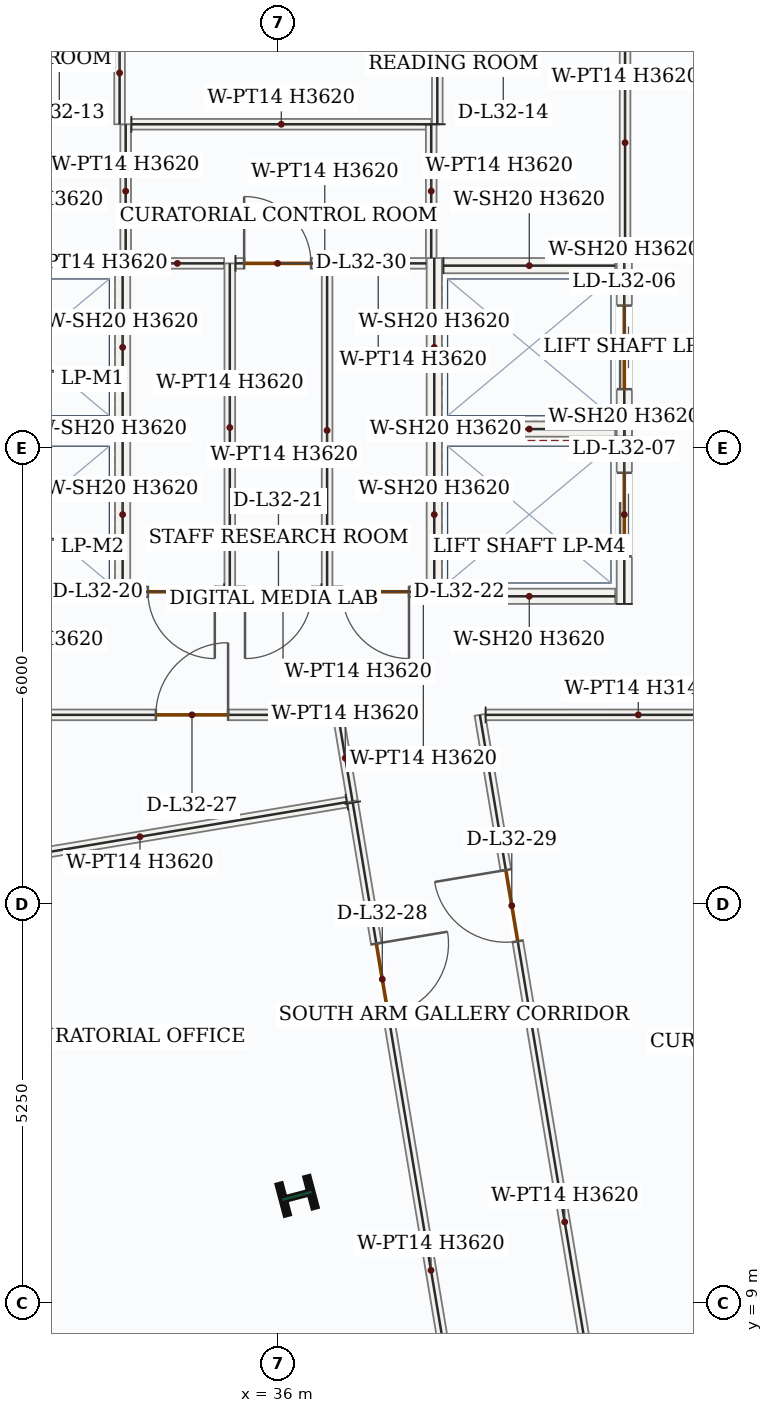
"""IFC4 building model, lengths in metres.
Left out: names, types, materials, properties, quantities, classifications, styles, units other than length and angle.
Written with IfcOpenShell. Run it as: python <this file> out.ifc"""

import sys

from ifc_helpers import new_model, si_unit, direction, frame, frame_2d, origin, origin_2d, place, context, subcontext, project, spatial, rectangle, i_section, extrude, source, transform, mapped, element, fill, save


model = new_model("IFC4")
c1 = context("Model", 3, precision=1e-05, world=origin(), true_north=direction((0.0, 1.0)))
c2 = subcontext(c1, "Body", "Model", "MODEL_VIEW")
j1 = project(units=[si_unit("LENGTHUNIT", "METRE"), si_unit("PLANEANGLEUNIT", "RADIAN")], contexts=[c1])
p1 = place(None, origin())
s1 = spatial("IfcSite", under=j1, at=p1, CompositionType="ELEMENT")
p2 = place(p1, origin())
s2 = spatial("IfcBuilding", under=s1, at=p2, CompositionType="ELEMENT")
p3 = place(p2, frame((0.0, 0.0, 143.4)))
s3 = spatial("IfcBuildingStorey", under=s2, at=p3, CompositionType="ELEMENT", Elevation=143.4)
m1 = source(origin(), c2, "Body", "SweptSolid", [
    extrude(i_section(OverallWidth=0.412, OverallDepth=0.435, WebThickness=0.036, FlangeThickness=0.057, FilletRadius=0.018, at=origin_2d()), origin(), (0.0, 0.0, 1.0), 3.9),
])
p4 = place(p3, frame((36.245, 10.412, 0.0), z_axis=(0.0, 0.0, 1.0), x_axis=(-0.255445757936, 0.966823388604, 0.0)))
e1 = element("IfcColumn", 1, at=p4, inside=s3, PredefinedType="COLUMN", context=c2, shape_type="MappedRepresentation", body=[
    mapped(m1, transform((0.0, 0.0, 0.0), x_axis=(1.0, 0.0, 0.0), y_axis=(0.0, 1.0, 0.0), z_axis=(0.0, 0.0, 1.0), scale=1.0)),
])
m2 = source(origin(), c2, "Body", "SweptSolid", [
    extrude(rectangle(XDim=2.35, YDim=0.2, at=frame_2d((1.175, 0.0))), origin(), (0.0, 0.0, 1.0), 3.62),
])
p5 = place(p3, frame((33.95, 20.4, 0.0), z_axis=(0.0, 0.0, 1.0), x_axis=(0.0, 1.0, 0.0)))
e2 = element("IfcWall", 2, at=p5, inside=s3, PredefinedType="SOLIDWALL", context=c2, shape_type="MappedRepresentation", body=[
    mapped(m2, transform((0.0, 0.0, 0.0), x_axis=(1.0, 0.0, 0.0), y_axis=(0.0, 1.0, 0.0), z_axis=(0.0, 0.0, 1.0), scale=1.0)),
])
m3 = source(origin(), c2, "Body", "SweptSolid", [
    extrude(rectangle(XDim=2.26, YDim=0.2, at=frame_2d((1.13, 0.0))), origin(), (0.0, 0.0, 1.0), 3.62),
])
for number, where, z_axis, x_axis in (
    (3, (31.57, 20.5, 0.0), (0.0, 0.0, 1.0), (1.0, 0.0, 0.0)),
    (4, (31.57, 22.65, 0.0), (0.0, 0.0, 1.0), (1.0, 0.0, 0.0)),
):
    element("IfcWall", number, at=place(p3, frame(where, z_axis=z_axis, x_axis=x_axis)), inside=s3, PredefinedType="SOLIDWALL", context=c2, shape_type="MappedRepresentation", body=[
        mapped(m3, transform((0.0, 0.0, 0.0), x_axis=(1.0, 0.0, 0.0), y_axis=(0.0, 1.0, 0.0), z_axis=(0.0, 0.0, 1.0), scale=1.0)),
    ])
p6 = place(p3, frame((33.95, 18.2, 0.0), z_axis=(0.0, 0.0, 1.0), x_axis=(0.0, 1.0, 0.0)))
e5 = element("IfcWall", 5, at=p6, inside=s3, PredefinedType="SOLIDWALL", context=c2, shape_type="MappedRepresentation", body=[
    mapped(m2, transform((0.0, 0.0, 0.0), x_axis=(1.0, 0.0, 0.0), y_axis=(0.0, 1.0, 0.0), z_axis=(0.0, 0.0, 1.0), scale=1.0)),
])
p7 = place(p3, frame((31.57, 18.3, 0.0), z_axis=(0.0, 0.0, 1.0), x_axis=(1.0, 0.0, 0.0)))
e6 = element("IfcWall", 6, at=p7, inside=s3, PredefinedType="SOLIDWALL", context=c2, shape_type="MappedRepresentation", body=[
    mapped(m3, transform((0.0, 0.0, 0.0), x_axis=(1.0, 0.0, 0.0), y_axis=(0.0, 1.0, 0.0), z_axis=(0.0, 0.0, 1.0), scale=1.0)),
])
p8 = place(p3, frame((38.05, 20.4, 0.0), z_axis=(0.0, 0.0, 1.0), x_axis=(0.0, 1.0, 0.0)))
e7 = element("IfcWall", 7, at=p8, inside=s3, PredefinedType="SOLIDWALL", context=c2, shape_type="MappedRepresentation", body=[
    mapped(m2, transform((0.0, 0.0, 0.0), x_axis=(1.0, 0.0, 0.0), y_axis=(0.0, 1.0, 0.0), z_axis=(0.0, 0.0, 1.0), scale=1.0)),
])
p9 = place(p3, frame((40.55, 20.4, 0.0), z_axis=(0.0, 0.0, 1.0), x_axis=(0.0, 1.0, 0.0)))
e8 = element("IfcWall", 8, at=p9, inside=s3, PredefinedType="SOLIDWALL", context=c2, shape_type="SweptSolid", body=[
    extrude(rectangle(XDim=2.35, YDim=0.2, at=frame_2d((1.175, 0.0))), origin(), (0.0, 0.0, 1.0), 3.62),
])
p10 = place(p9, frame((0.625, 0.0, 0.0)))
e9 = element("IfcOpeningElement", 9, at=p10, cuts=e8, PredefinedType="OPENING", context=c2, shape_type="SweptSolid", body=[
    extrude(rectangle(XDim=1.1, YDim=2.15, at=frame_2d((0.55, 1.075))), frame((0.0, 0.11, 0.0), z_axis=(0.0, -1.0, 0.0), x_axis=(1.0, 0.0, 0.0)), (0.0, 0.0, 1.0), 0.22),
])
for number, where, z_axis, x_axis in (
    (10, (38.17, 20.5, 0.0), (0.0, 0.0, 1.0), (1.0, 0.0, 0.0)),
    (11, (38.17, 22.65, 0.0), (0.0, 0.0, 1.0), (1.0, 0.0, 0.0)),
):
    element("IfcWall", number, at=place(p3, frame(where, z_axis=z_axis, x_axis=x_axis)), inside=s3, PredefinedType="SOLIDWALL", context=c2, shape_type="MappedRepresentation", body=[
        mapped(m3, transform((0.0, 0.0, 0.0), x_axis=(1.0, 0.0, 0.0), y_axis=(0.0, 1.0, 0.0), z_axis=(0.0, 0.0, 1.0), scale=1.0)),
    ])
p11 = place(p3, frame((38.05, 18.2, 0.0), z_axis=(0.0, 0.0, 1.0), x_axis=(0.0, 1.0, 0.0)))
e12 = element("IfcWall", 12, at=p11, inside=s3, PredefinedType="SOLIDWALL", context=c2, shape_type="MappedRepresentation", body=[
    mapped(m2, transform((0.0, 0.0, 0.0), x_axis=(1.0, 0.0, 0.0), y_axis=(0.0, 1.0, 0.0), z_axis=(0.0, 0.0, 1.0), scale=1.0)),
])
p12 = place(p3, frame((40.55, 18.2, 0.0), z_axis=(0.0, 0.0, 1.0), x_axis=(0.0, 1.0, 0.0)))
e13 = element("IfcWall", 13, at=p12, inside=s3, PredefinedType="SOLIDWALL", context=c2, shape_type="SweptSolid", body=[
    extrude(rectangle(XDim=2.35, YDim=0.2, at=frame_2d((1.175, 0.0))), origin(), (0.0, 0.0, 1.0), 3.62),
])
p13 = place(p12, frame((0.625, 0.0, 0.0)))
e14 = element("IfcOpeningElement", 14, at=p13, cuts=e13, PredefinedType="OPENING", context=c2, shape_type="SweptSolid", body=[
    extrude(rectangle(XDim=1.1, YDim=2.15, at=frame_2d((0.55, 1.075))), frame((0.0, 0.11, 0.0), z_axis=(0.0, -1.0, 0.0), x_axis=(1.0, 0.0, 0.0)), (0.0, 0.0, 1.0), 0.22),
])
p14 = place(p3, frame((38.17, 18.3, 0.0), z_axis=(0.0, 0.0, 1.0), x_axis=(1.0, 0.0, 0.0)))
e15 = element("IfcWall", 15, at=p14, inside=s3, PredefinedType="SOLIDWALL", context=c2, shape_type="MappedRepresentation", body=[
    mapped(m3, transform((0.0, 0.0, 0.0), x_axis=(1.0, 0.0, 0.0), y_axis=(0.0, 1.0, 0.0), z_axis=(0.0, 0.0, 1.0), scale=1.0)),
])
m4 = source(origin(), c2, "Body", "SweptSolid", [
    extrude(rectangle(XDim=4.32, YDim=0.14, at=frame_2d((2.16, 0.0))), origin(), (0.0, 0.0, 1.0), 3.62),
])
p15 = place(p3, frame((35.36, 18.36, 0.0), z_axis=(0.0, 0.0, 1.0), x_axis=(0.0, 1.0, 0.0)))
e16 = element("IfcWall", 16, at=p15, inside=s3, PredefinedType="PARTITIONING", context=c2, shape_type="MappedRepresentation", body=[
    mapped(m4, transform((0.0, 0.0, 0.0), x_axis=(1.0, 0.0, 0.0), y_axis=(0.0, 1.0, 0.0), z_axis=(0.0, 0.0, 1.0), scale=1.0)),
])
p16 = place(p3, frame((35.435, 22.68, 0.0), z_axis=(0.0, 0.0, 1.0), x_axis=(1.0, 0.0, 0.0)))
e17 = element("IfcWall", 17, at=p16, inside=s3, PredefinedType="PARTITIONING", context=c2, shape_type="SweptSolid", body=[
    extrude(rectangle(XDim=1.205, YDim=0.14, at=frame_2d((0.603, 0.0))), origin(), (0.0, 0.0, 1.0), 3.62),
])
p17 = place(p16, frame((0.114, 0.0, 0.0)))
e18 = element("IfcOpeningElement", 18, at=p17, cuts=e17, PredefinedType="OPENING", context=c2, shape_type="SweptSolid", body=[
    extrude(rectangle(XDim=0.88, YDim=2.1, at=frame_2d((0.44, 1.05))), frame((0.0, 0.08, 0.0), z_axis=(0.0, -1.0, 0.0), x_axis=(1.0, 0.0, 0.0)), (0.0, 0.0, 1.0), 0.16),
])
m5 = source(origin(), c2, "Body", "SweptSolid", [
    extrude(rectangle(XDim=4.245, YDim=0.14, at=frame_2d((2.123, 0.0))), origin(), (0.0, 0.0, 1.0), 3.62),
])
p18 = place(p3, frame((36.64, 22.605, 0.0), z_axis=(0.0, 0.0, 1.0), x_axis=(0.0, -1.0, 0.0)))
e19 = element("IfcWall", 19, at=p18, inside=s3, PredefinedType="PARTITIONING", context=c2, shape_type="MappedRepresentation", body=[
    mapped(m5, transform((0.0, 0.0, 0.0), x_axis=(1.0, 0.0, 0.0), y_axis=(0.0, 1.0, 0.0), z_axis=(0.0, 0.0, 1.0), scale=1.0)),
])
p19 = place(p3, frame((36.565, 18.36, 0.0), z_axis=(0.0, 0.0, 1.0), x_axis=(-1.0, 0.0, 0.0)))
e20 = element("IfcWall", 20, at=p19, inside=s3, PredefinedType="PARTITIONING", context=c2, shape_type="SweptSolid", body=[
    extrude(rectangle(XDim=1.13, YDim=0.14, at=frame_2d((0.565, 0.0))), origin(), (0.0, 0.0, 1.0), 3.62),
])
p20 = place(p19, frame((0.125, 0.0, 0.0)))
e21 = element("IfcOpeningElement", 21, at=p20, cuts=e20, PredefinedType="OPENING", context=c2, shape_type="SweptSolid", body=[
    extrude(rectangle(XDim=0.88, YDim=2.1, at=frame_2d((0.44, 1.05))), frame((0.0, 0.08, 0.0), z_axis=(0.0, -1.0, 0.0), x_axis=(1.0, 0.0, 0.0)), (0.0, 0.0, 1.0), 0.16),
])
m6 = source(origin(), c2, "Body", "SweptSolid", [
    extrude(rectangle(XDim=1.23, YDim=0.14, at=frame_2d((0.615, 0.0))), origin(), (0.0, 0.0, 1.0), 3.62),
])
p21 = place(p3, frame((34.055, 22.68, 0.0), z_axis=(0.0, 0.0, 1.0), x_axis=(1.0, 0.0, 0.0)))
e22 = element("IfcWall", 22, at=p21, inside=s3, PredefinedType="PARTITIONING", context=c2, shape_type="MappedRepresentation", body=[
    mapped(m6, transform((0.0, 0.0, 0.0), x_axis=(1.0, 0.0, 0.0), y_axis=(0.0, 1.0, 0.0), z_axis=(0.0, 0.0, 1.0), scale=1.0)),
])
p22 = place(p3, frame((35.285, 18.36, 0.0), z_axis=(0.0, 0.0, 1.0), x_axis=(-1.0, 0.0, 0.0)))
e23 = element("IfcWall", 23, at=p22, inside=s3, PredefinedType="PARTITIONING", context=c2, shape_type="SweptSolid", body=[
    extrude(rectangle(XDim=1.23, YDim=0.14, at=frame_2d((0.615, 0.0))), origin(), (0.0, 0.0, 1.0), 3.62),
])
p23 = place(p22, frame((0.123, 0.0, 0.0)))
e24 = element("IfcOpeningElement", 24, at=p23, cuts=e23, PredefinedType="OPENING", context=c2, shape_type="SweptSolid", body=[
    extrude(rectangle(XDim=0.88, YDim=2.1, at=frame_2d((0.44, 1.05))), frame((0.0, 0.08, 0.0), z_axis=(0.0, -1.0, 0.0), x_axis=(1.0, 0.0, 0.0)), (0.0, 0.0, 1.0), 0.16),
])
m7 = source(origin(), c2, "Body", "SweptSolid", [
    extrude(rectangle(XDim=1.265, YDim=0.14, at=frame_2d((0.633, 0.0))), origin(), (0.0, 0.0, 1.0), 3.62),
])
p24 = place(p3, frame((36.68, 22.68, 0.0), z_axis=(0.0, 0.0, 1.0), x_axis=(1.0, 0.0, 0.0)))
e25 = element("IfcWall", 25, at=p24, inside=s3, PredefinedType="PARTITIONING", context=c2, shape_type="MappedRepresentation", body=[
    mapped(m7, transform((0.0, 0.0, 0.0), x_axis=(1.0, 0.0, 0.0), y_axis=(0.0, 1.0, 0.0), z_axis=(0.0, 0.0, 1.0), scale=1.0)),
])
p25 = place(p3, frame((37.945, 18.36, 0.0), z_axis=(0.0, 0.0, 1.0), x_axis=(-1.0, 0.0, 0.0)))
e26 = element("IfcWall", 26, at=p25, inside=s3, PredefinedType="PARTITIONING", context=c2, shape_type="SweptSolid", body=[
    extrude(rectangle(XDim=1.23, YDim=0.14, at=frame_2d((0.615, 0.0))), origin(), (0.0, 0.0, 1.0), 3.62),
])
p26 = place(p25, frame((0.228, 0.0, 0.0)))
e27 = element("IfcOpeningElement", 27, at=p26, cuts=e26, PredefinedType="OPENING", context=c2, shape_type="SweptSolid", body=[
    extrude(rectangle(XDim=0.88, YDim=2.1, at=frame_2d((0.44, 1.05))), frame((0.0, 0.08, 0.0), z_axis=(0.0, -1.0, 0.0), x_axis=(1.0, 0.0, 0.0)), (0.0, 0.0, 1.0), 0.16),
])
m8 = source(origin(), c2, "Body", "SweptSolid", [
    extrude(rectangle(XDim=1.76, YDim=0.14, at=frame_2d((0.88, 0.0))), origin(), (0.0, 0.0, 1.0), 3.62),
])
p27 = place(p3, frame((33.99, 22.75, 0.0), z_axis=(0.0, 0.0, 1.0), x_axis=(0.0, 1.0, 0.0)))
e28 = element("IfcWall", 28, at=p27, inside=s3, PredefinedType="PARTITIONING", context=c2, shape_type="MappedRepresentation", body=[
    mapped(m8, transform((0.0, 0.0, 0.0), x_axis=(1.0, 0.0, 0.0), y_axis=(0.0, 1.0, 0.0), z_axis=(0.0, 0.0, 1.0), scale=1.0)),
])
m9 = source(origin(), c2, "Body", "SweptSolid", [
    extrude(rectangle(XDim=3.945, YDim=0.14, at=frame_2d((1.973, 0.0))), origin(), (0.0, 0.0, 1.0), 3.62),
])
p28 = place(p3, frame((34.065, 24.51, 0.0), z_axis=(0.0, 0.0, 1.0), x_axis=(1.0, 0.0, 0.0)))
e29 = element("IfcWall", 29, at=p28, inside=s3, PredefinedType="PARTITIONING", context=c2, shape_type="MappedRepresentation", body=[
    mapped(m9, transform((0.0, 0.0, 0.0), x_axis=(1.0, 0.0, 0.0), y_axis=(0.0, 1.0, 0.0), z_axis=(0.0, 0.0, 1.0), scale=1.0)),
])
p29 = place(p3, frame((38.01, 24.51, 0.0), z_axis=(0.0, 0.0, 1.0), x_axis=(0.0, -1.0, 0.0)))
e30 = element("IfcWall", 30, at=p29, inside=s3, PredefinedType="PARTITIONING", context=c2, shape_type="MappedRepresentation", body=[
    mapped(m8, transform((0.0, 0.0, 0.0), x_axis=(1.0, 0.0, 0.0), y_axis=(0.0, 1.0, 0.0), z_axis=(0.0, 0.0, 1.0), scale=1.0)),
])
m10 = source(origin(), c2, "Body", "SweptSolid", [
    extrude(rectangle(XDim=1.35, YDim=0.14, at=frame_2d((0.675, 0.0))), origin(), (0.0, 0.0, 1.0), 3.62),
])
for number, where, z_axis, x_axis in (
    (31, (33.91, 25.86, 0.0), (0.0, 0.0, 1.0), (0.0, -1.0, 0.0)),
    (32, (38.09, 24.51, 0.0), (0.0, 0.0, 1.0), (0.0, 1.0, 0.0)),
):
    element("IfcWall", number, at=place(p3, frame(where, z_axis=z_axis, x_axis=x_axis)), inside=s3, PredefinedType="PARTITIONING", context=c2, shape_type="MappedRepresentation", body=[
        mapped(m10, transform((0.0, 0.0, 0.0), x_axis=(1.0, 0.0, 0.0), y_axis=(0.0, 1.0, 0.0), z_axis=(0.0, 0.0, 1.0), scale=1.0)),
    ])
m11 = source(origin(), c2, "Body", "SweptSolid", [
    extrude(rectangle(XDim=3.035, YDim=0.14, at=frame_2d((1.518, 0.0))), origin(), (0.0, 0.0, 1.0), 3.62),
])
p30 = place(p3, frame((40.56, 25.785, 0.0), z_axis=(0.0, 0.0, 1.0), x_axis=(0.0, -1.0, 0.0)))
e33 = element("IfcWall", 33, at=p30, inside=s3, PredefinedType="PARTITIONING", context=c2, shape_type="MappedRepresentation", body=[
    mapped(m11, transform((0.0, 0.0, 0.0), x_axis=(1.0, 0.0, 0.0), y_axis=(0.0, 1.0, 0.0), z_axis=(0.0, 0.0, 1.0), scale=1.0)),
])
p31 = place(p3, frame((29.258, 16.74, 0.0), z_axis=(0.0, 0.0, 1.0), x_axis=(0.999999999474, -3.2436991e-05, 0.0)))
e34 = element("IfcWall", 34, at=p31, inside=s3, PredefinedType="PARTITIONING", context=c2, shape_type="SweptSolid", body=[
    extrude(rectangle(XDim=7.527, YDim=0.14, at=frame_2d((3.763, 0.0))), origin(), (0.0, 0.0, 1.0), 3.62),
])
p32 = place(p31, frame((5.13, 0.0, 0.0)))
e35 = element("IfcOpeningElement", 35, at=p32, cuts=e34, PredefinedType="OPENING", context=c2, shape_type="SweptSolid", body=[
    extrude(rectangle(XDim=0.95, YDim=2.15, at=frame_2d((0.475, 1.075))), frame((0.0, 0.08, 0.0), z_axis=(0.0, -1.0, 0.0), x_axis=(1.0, 0.0, 0.0)), (0.0, 0.0, 1.0), 0.16),
])
m12 = source(origin(), c2, "Body", "SweptSolid", [
    extrude(rectangle(XDim=1.151, YDim=0.14, at=frame_2d((0.576, 0.0))), origin(), (0.0, 0.0, 1.0), 3.62),
])
p33 = place(p3, frame((36.784, 16.74, 0.0), z_axis=(0.0, 0.0, 1.0), x_axis=(0.164983559387, -0.986296317104, 0.0)))
e36 = element("IfcWall", 36, at=p33, inside=s3, PredefinedType="PARTITIONING", context=c2, shape_type="MappedRepresentation", body=[
    mapped(m12, transform((0.0, 0.0, 0.0), x_axis=(1.0, 0.0, 0.0), y_axis=(0.0, 1.0, 0.0), z_axis=(0.0, 0.0, 1.0), scale=1.0)),
])
m13 = source(origin(), c2, "Body", "SweptSolid", [
    extrude(rectangle(XDim=5.52, YDim=0.14, at=frame_2d((2.76, 0.0))), origin(), (0.0, 0.0, 1.0), 3.62),
])
p34 = place(p3, frame((36.9, 15.592, 0.0), z_axis=(0.0, 0.0, 1.0), x_axis=(-0.986290930087, -0.165015760545, 0.0)))
e37 = element("IfcWall", 37, at=p34, inside=s3, PredefinedType="PARTITIONING", context=c2, shape_type="MappedRepresentation", body=[
    mapped(m13, transform((0.0, 0.0, 0.0), x_axis=(1.0, 0.0, 0.0), y_axis=(0.0, 1.0, 0.0), z_axis=(0.0, 0.0, 1.0), scale=1.0)),
])
p35 = place(p3, frame((36.978, 15.585, 0.0), z_axis=(0.0, 0.0, 1.0), x_axis=(0.165024399413, -0.986289484684, 0.0)))
e38 = element("IfcWall", 38, at=p35, inside=s3, PredefinedType="PARTITIONING", context=c2, shape_type="SweptSolid", body=[
    extrude(rectangle(XDim=9.495, YDim=0.14, at=frame_2d((4.748, 0.0))), origin(), (0.0, 0.0, 1.0), 3.62),
])
p36 = place(p35, frame((1.88, 0.0, 0.0)))
e39 = element("IfcOpeningElement", 39, at=p36, cuts=e38, PredefinedType="OPENING", context=c2, shape_type="SweptSolid", body=[
    extrude(rectangle(XDim=0.95, YDim=2.15, at=frame_2d((0.475, 1.075))), frame((0.0, 0.08, 0.0), z_axis=(0.0, -1.0, 0.0), x_axis=(1.0, 0.0, 0.0)), (0.0, 0.0, 1.0), 0.16),
])
p37 = place(p3, frame((40.359, 6.524, 0.0), z_axis=(0.0, 0.0, 1.0), x_axis=(-0.165056345303, 0.986284139016, 0.0)))
e40 = element("IfcWall", 40, at=p37, inside=s3, PredefinedType="PARTITIONING", context=c2, shape_type="SweptSolid", body=[
    extrude(rectangle(XDim=10.358, YDim=0.14, at=frame_2d((5.179, 0.0))), origin(), (0.0, 0.0, 1.0), 3.62),
])
p38 = place(p37, frame((7.338, 0.0, 0.0)))
e41 = element("IfcOpeningElement", 41, at=p38, cuts=e40, PredefinedType="OPENING", context=c2, shape_type="SweptSolid", body=[
    extrude(rectangle(XDim=0.95, YDim=2.15, at=frame_2d((0.475, 1.075))), frame((0.0, 0.08, 0.0), z_axis=(0.0, -1.0, 0.0), x_axis=(1.0, 0.0, 0.0)), (0.0, 0.0, 1.0), 0.16),
])
m14 = source(origin(), c2, "Body", "SweptSolid", [
    extrude(rectangle(XDim=4.017, YDim=0.14, at=frame_2d((2.008, 0.0))), origin(), (0.0, 0.0, 1.0), 3.149),
])
p39 = place(p3, frame((38.726, 16.74, 0.0), z_axis=(0.0, 0.0, 1.0), x_axis=(0.999999998153, 6.0779189e-05, 0.0)))
e42 = element("IfcWall", 42, at=p39, inside=s3, PredefinedType="PARTITIONING", context=c2, shape_type="MappedRepresentation", body=[
    mapped(m14, transform((0.0, 0.0, 0.0), x_axis=(1.0, 0.0, 0.0), y_axis=(0.0, 1.0, 0.0), z_axis=(0.0, 0.0, 1.0), scale=1.0)),
])
m15 = source(origin(), c2, "Body", "SweptSolid", [
    extrude(rectangle(XDim=1.1, YDim=2.15, at=frame_2d((0.55, 1.075))), frame((0.0, 0.025, 0.0), z_axis=(0.0, -1.0, 0.0), x_axis=(1.0, 0.0, 0.0)), (0.0, 0.0, 1.0), 0.05),
])
p40 = place(p10, origin())
e43 = element("IfcDoor", 43, at=p40, inside=s3, OperationType="DOUBLE_DOOR_SLIDING", PredefinedType="DOOR", context=c2, shape_type="MappedRepresentation", body=[
    mapped(m15, transform((0.0, 0.0, 0.0), x_axis=(1.0, 0.0, 0.0), y_axis=(0.0, 1.0, 0.0), z_axis=(0.0, 0.0, 1.0), scale=1.0)),
])
fill(e9, e43)
p41 = place(p13, origin())
e44 = element("IfcDoor", 44, at=p41, inside=s3, OperationType="DOUBLE_DOOR_SLIDING", PredefinedType="DOOR", context=c2, shape_type="MappedRepresentation", body=[
    mapped(m15, transform((0.0, 0.0, 0.0), x_axis=(1.0, 0.0, 0.0), y_axis=(0.0, 1.0, 0.0), z_axis=(0.0, 0.0, 1.0), scale=1.0)),
])
fill(e14, e44)
m16 = source(origin(), c2, "Body", "SweptSolid", [
    extrude(rectangle(XDim=0.88, YDim=2.1, at=frame_2d((0.44, 1.05))), frame((0.0, 0.025, 0.0), z_axis=(0.0, -1.0, 0.0), x_axis=(1.0, 0.0, 0.0)), (0.0, 0.0, 1.0), 0.05),
])
p42 = place(p23, origin())
e45 = element("IfcDoor", 45, at=p42, inside=s3, OperationType="SINGLE_SWING_LEFT", PredefinedType="DOOR", context=c2, shape_type="MappedRepresentation", body=[
    mapped(m16, transform((0.0, 0.0, 0.0), x_axis=(1.0, 0.0, 0.0), y_axis=(0.0, 1.0, 0.0), z_axis=(0.0, 0.0, 1.0), scale=1.0)),
])
fill(e24, e45)
p43 = place(p20, origin())
e46 = element("IfcDoor", 46, at=p43, inside=s3, OperationType="SINGLE_SWING_RIGHT", PredefinedType="DOOR", context=c2, shape_type="MappedRepresentation", body=[
    mapped(m16, transform((0.0, 0.0, 0.0), x_axis=(1.0, 0.0, 0.0), y_axis=(0.0, 1.0, 0.0), z_axis=(0.0, 0.0, 1.0), scale=1.0)),
])
fill(e21, e46)
p44 = place(p26, origin())
e47 = element("IfcDoor", 47, at=p44, inside=s3, OperationType="SINGLE_SWING_LEFT", PredefinedType="DOOR", context=c2, shape_type="MappedRepresentation", body=[
    mapped(m16, transform((0.0, 0.0, 0.0), x_axis=(1.0, 0.0, 0.0), y_axis=(0.0, 1.0, 0.0), z_axis=(0.0, 0.0, 1.0), scale=1.0)),
])
fill(e27, e47)
m17 = source(origin(), c2, "Body", "SweptSolid", [
    extrude(rectangle(XDim=0.95, YDim=2.15, at=frame_2d((0.475, 1.075))), frame((0.0, 0.025, 0.0), z_axis=(0.0, -1.0, 0.0), x_axis=(1.0, 0.0, 0.0)), (0.0, 0.0, 1.0), 0.05),
])
p45 = place(p32, origin())
e48 = element("IfcDoor", 48, at=p45, inside=s3, OperationType="SINGLE_SWING_RIGHT", PredefinedType="DOOR", context=c2, shape_type="MappedRepresentation", body=[
    mapped(m17, transform((0.0, 0.0, 0.0), x_axis=(1.0, 0.0, 0.0), y_axis=(0.0, 1.0, 0.0), z_axis=(0.0, 0.0, 1.0), scale=1.0)),
])
fill(e35, e48)
p46 = place(p36, origin())
e49 = element("IfcDoor", 49, at=p46, inside=s3, OperationType="SINGLE_SWING_LEFT", PredefinedType="DOOR", context=c2, shape_type="MappedRepresentation", body=[
    mapped(m17, transform((0.0, 0.0, 0.0), x_axis=(1.0, 0.0, 0.0), y_axis=(0.0, 1.0, 0.0), z_axis=(0.0, 0.0, 1.0), scale=1.0)),
])
fill(e39, e49)
p47 = place(p38, origin())
e50 = element("IfcDoor", 50, at=p47, inside=s3, OperationType="SINGLE_SWING_RIGHT", PredefinedType="DOOR", context=c2, shape_type="MappedRepresentation", body=[
    mapped(m17, transform((0.0, 0.0, 0.0), x_axis=(1.0, 0.0, 0.0), y_axis=(0.0, 1.0, 0.0), z_axis=(0.0, 0.0, 1.0), scale=1.0)),
])
fill(e41, e50)
p48 = place(p17, origin())
e51 = element("IfcDoor", 51, at=p48, inside=s3, OperationType="SINGLE_SWING_LEFT", PredefinedType="DOOR", context=c2, shape_type="MappedRepresentation", body=[
    mapped(m16, transform((0.0, 0.0, 0.0), x_axis=(1.0, 0.0, 0.0), y_axis=(0.0, 1.0, 0.0), z_axis=(0.0, 0.0, 1.0), scale=1.0)),
])
fill(e18, e51)
save(model, sys.argv[1])
